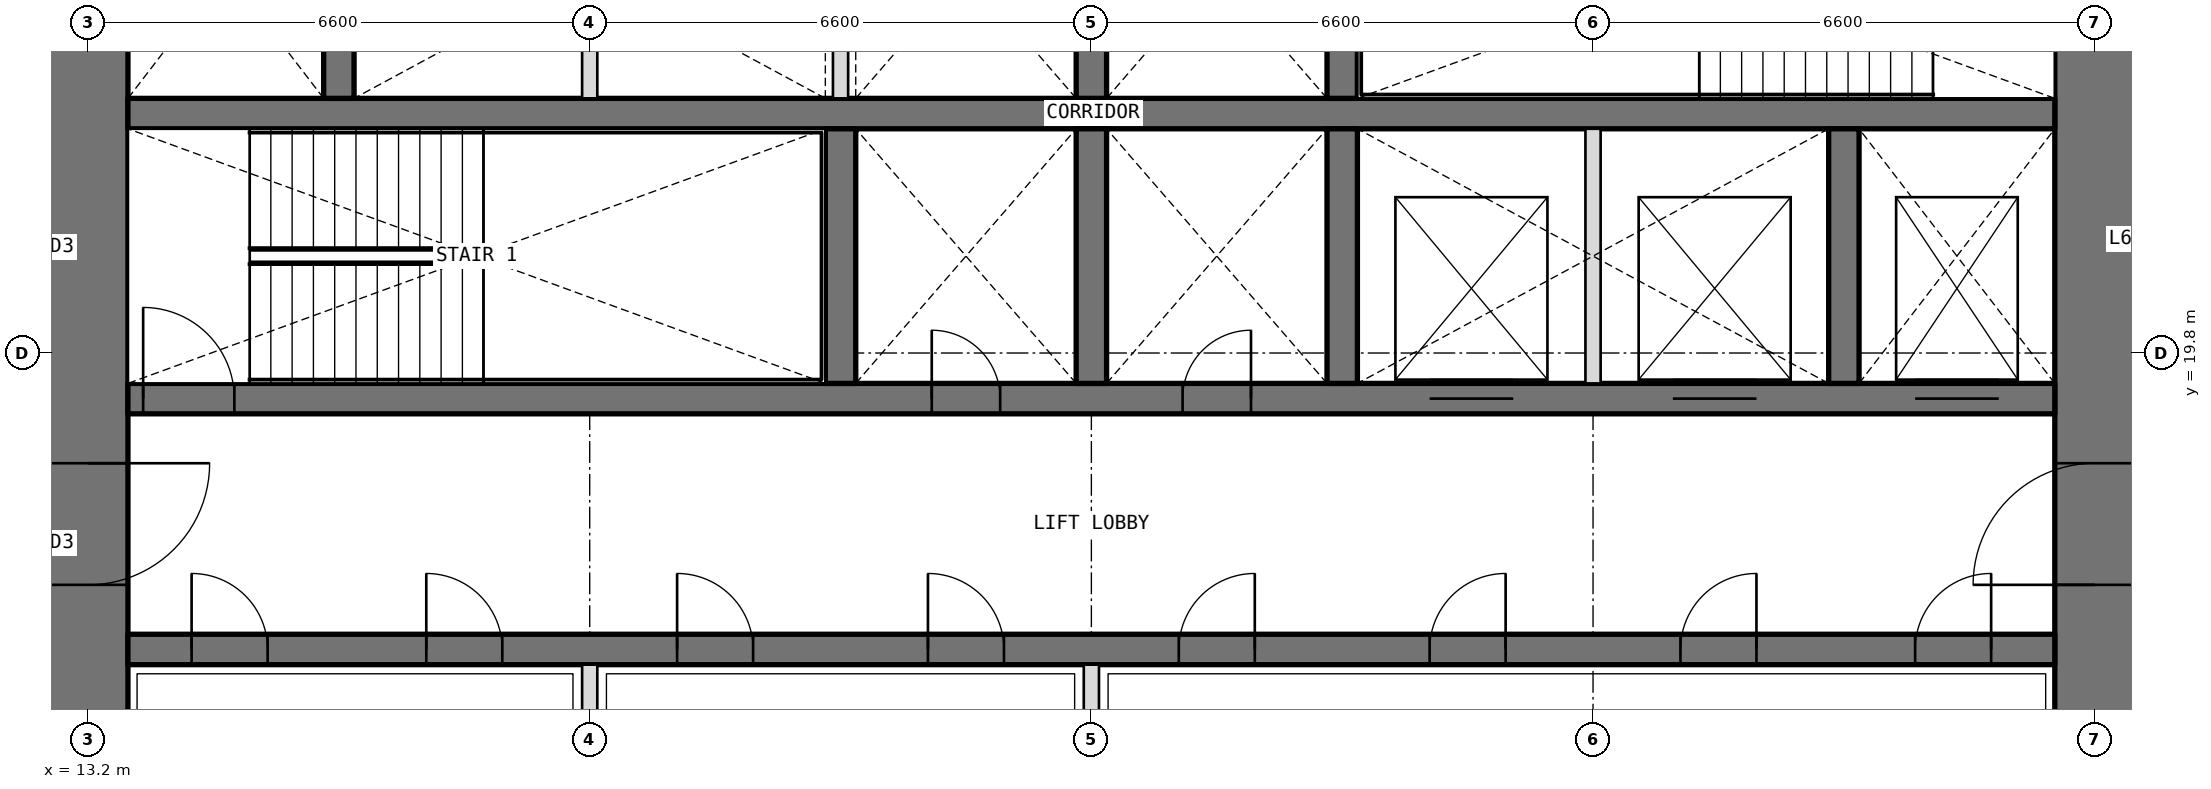
"""IFC4 building model, lengths in metres.
Left out: names, types, materials, properties, quantities, classifications, styles, units other than length and angle.
Written with IfcOpenShell. Run it as: python <this file> out.ifc"""

import sys

from ifc_helpers import new_model, si_unit, direction, frame, frame_2d, origin, place, context, subcontext, project, spatial, rectangle, extrude, element, fill, save


model = new_model("IFC4")
c1 = context("Model", 3, precision=1e-05, world=origin(), true_north=direction((0.0, 1.0)))
c2 = subcontext(c1, "Body", "Model", "MODEL_VIEW")
j1 = project(units=[si_unit("LENGTHUNIT", "METRE"), si_unit("PLANEANGLEUNIT", "RADIAN")], contexts=[c1])
p1 = place(None, origin())
s1 = spatial("IfcSite", under=j1, at=p1, CompositionType="ELEMENT")
p2 = place(p1, origin())
s2 = spatial("IfcBuilding", under=s1, at=p2, CompositionType="ELEMENT")
p3 = place(p2, frame((0.0, 0.0, 267.0)))
s3 = spatial("IfcBuildingStorey", under=s2, at=p3, CompositionType="ELEMENT", Elevation=267.0)
p4 = place(p3, frame((39.6, 13.725, 0.0), z_axis=(0.0, 0.0, 1.0), x_axis=(0.0, 1.0, 0.0)))
e1 = element("IfcWall", 1, at=p4, inside=s3, PredefinedType="SHEAR", context=c2, shape_type="SweptSolid", body=[
    extrude(rectangle(XDim=18.75, YDim=1.05, at=frame_2d((9.375, 0.0))), origin(), (0.0, 0.0, 1.0), 4.2),
])
p5 = place(p4, frame((3.025, 0.0, 0.0)))
e2 = element("IfcOpeningElement", 2, at=p5, cuts=e1, PredefinedType="OPENING", context=c2, shape_type="SweptSolid", body=[
    extrude(rectangle(XDim=1.6, YDim=2.1, at=frame_2d((0.8, 1.05))), frame((0.0, 0.535, 0.0), z_axis=(0.0, -1.0, 0.0), x_axis=(1.0, 0.0, 0.0)), (0.0, 0.0, 1.0), 1.07),
])
p6 = place(p4, frame((13.825, 0.0, 0.0)))
e3 = element("IfcOpeningElement", 3, at=p6, cuts=e1, PredefinedType="OPENING", context=c2, shape_type="SweptSolid", body=[
    extrude(rectangle(XDim=1.6, YDim=2.1, at=frame_2d((0.8, 1.05))), frame((0.0, 0.535, 0.0), z_axis=(0.0, -1.0, 0.0), x_axis=(1.0, 0.0, 0.0)), (0.0, 0.0, 1.0), 1.07),
])
p7 = place(p3, frame((13.2, 32.475, 0.0), z_axis=(0.0, 0.0, 1.0), x_axis=(0.0, -1.0, 0.0)))
e4 = element("IfcWall", 4, at=p7, inside=s3, PredefinedType="SHEAR", context=c2, shape_type="SweptSolid", body=[
    extrude(rectangle(XDim=18.75, YDim=1.05, at=frame_2d((9.375, 0.0))), origin(), (0.0, 0.0, 1.0), 4.2),
])
p8 = place(p7, frame((14.125, 0.0, 0.0)))
e5 = element("IfcOpeningElement", 5, at=p8, cuts=e4, PredefinedType="OPENING", context=c2, shape_type="SweptSolid", body=[
    extrude(rectangle(XDim=1.6, YDim=2.1, at=frame_2d((0.8, 1.05))), frame((0.0, 0.535, 0.0), z_axis=(0.0, -1.0, 0.0), x_axis=(1.0, 0.0, 0.0)), (0.0, 0.0, 1.0), 1.07),
])
p9 = place(p7, frame((3.325, 0.0, 0.0)))
e6 = element("IfcOpeningElement", 6, at=p9, cuts=e4, PredefinedType="OPENING", context=c2, shape_type="SweptSolid", body=[
    extrude(rectangle(XDim=1.6, YDim=2.1, at=frame_2d((0.8, 1.05))), frame((0.0, 0.535, 0.0), z_axis=(0.0, -1.0, 0.0), x_axis=(1.0, 0.0, 0.0)), (0.0, 0.0, 1.0), 1.07),
])
p10 = place(p3, frame((13.725, 15.9, 0.0), z_axis=(0.0, 0.0, 1.0), x_axis=(1.0, 0.0, 0.0)))
e7 = element("IfcWall", 7, at=p10, inside=s3, PredefinedType="SHEAR", context=c2, shape_type="SweptSolid", body=[
    extrude(rectangle(XDim=25.35, YDim=0.4, at=frame_2d((12.675, 0.0))), origin(), (0.0, 0.0, 1.0), 4.2),
])
p11 = place(p10, frame((0.837, 0.0, 0.0)))
e8 = element("IfcOpeningElement", 8, at=p11, cuts=e7, PredefinedType="OPENING", context=c2, shape_type="SweptSolid", body=[
    extrude(rectangle(XDim=1.0, YDim=2.1, at=frame_2d((0.5, 1.05))), frame((0.0, 0.21, 0.0), z_axis=(0.0, -1.0, 0.0), x_axis=(1.0, 0.0, 0.0)), (0.0, 0.0, 1.0), 0.42),
])
p12 = place(p10, frame((3.925, 0.0, 0.0)))
e9 = element("IfcOpeningElement", 9, at=p12, cuts=e7, PredefinedType="OPENING", context=c2, shape_type="SweptSolid", body=[
    extrude(rectangle(XDim=1.0, YDim=2.1, at=frame_2d((0.5, 1.05))), frame((0.0, 0.21, 0.0), z_axis=(0.0, -1.0, 0.0), x_axis=(1.0, 0.0, 0.0)), (0.0, 0.0, 1.0), 0.42),
])
p13 = place(p10, frame((7.225, 0.0, 0.0)))
e10 = element("IfcOpeningElement", 10, at=p13, cuts=e7, PredefinedType="OPENING", context=c2, shape_type="SweptSolid", body=[
    extrude(rectangle(XDim=1.0, YDim=2.1, at=frame_2d((0.5, 1.05))), frame((0.0, 0.21, 0.0), z_axis=(0.0, -1.0, 0.0), x_axis=(1.0, 0.0, 0.0)), (0.0, 0.0, 1.0), 0.42),
])
p14 = place(p10, frame((10.525, 0.0, 0.0)))
e11 = element("IfcOpeningElement", 11, at=p14, cuts=e7, PredefinedType="OPENING", context=c2, shape_type="SweptSolid", body=[
    extrude(rectangle(XDim=1.0, YDim=2.1, at=frame_2d((0.5, 1.05))), frame((0.0, 0.21, 0.0), z_axis=(0.0, -1.0, 0.0), x_axis=(1.0, 0.0, 0.0)), (0.0, 0.0, 1.0), 0.42),
])
p15 = place(p10, frame((13.825, 0.0, 0.0)))
e12 = element("IfcOpeningElement", 12, at=p15, cuts=e7, PredefinedType="OPENING", context=c2, shape_type="SweptSolid", body=[
    extrude(rectangle(XDim=1.0, YDim=2.1, at=frame_2d((0.5, 1.05))), frame((0.0, 0.21, 0.0), z_axis=(0.0, -1.0, 0.0), x_axis=(1.0, 0.0, 0.0)), (0.0, 0.0, 1.0), 0.42),
])
p16 = place(p10, frame((17.125, 0.0, 0.0)))
e13 = element("IfcOpeningElement", 13, at=p16, cuts=e7, PredefinedType="OPENING", context=c2, shape_type="SweptSolid", body=[
    extrude(rectangle(XDim=1.0, YDim=2.1, at=frame_2d((0.5, 1.05))), frame((0.0, 0.21, 0.0), z_axis=(0.0, -1.0, 0.0), x_axis=(1.0, 0.0, 0.0)), (0.0, 0.0, 1.0), 0.42),
])
p17 = place(p10, frame((20.425, 0.0, 0.0)))
e14 = element("IfcOpeningElement", 14, at=p17, cuts=e7, PredefinedType="OPENING", context=c2, shape_type="SweptSolid", body=[
    extrude(rectangle(XDim=1.0, YDim=2.1, at=frame_2d((0.5, 1.05))), frame((0.0, 0.21, 0.0), z_axis=(0.0, -1.0, 0.0), x_axis=(1.0, 0.0, 0.0)), (0.0, 0.0, 1.0), 0.42),
])
p18 = place(p10, frame((23.512, 0.0, 0.0)))
e15 = element("IfcOpeningElement", 15, at=p18, cuts=e7, PredefinedType="OPENING", context=c2, shape_type="SweptSolid", body=[
    extrude(rectangle(XDim=1.0, YDim=2.1, at=frame_2d((0.5, 1.05))), frame((0.0, 0.21, 0.0), z_axis=(0.0, -1.0, 0.0), x_axis=(1.0, 0.0, 0.0)), (0.0, 0.0, 1.0), 0.42),
])
p19 = place(p3, frame((13.725, 19.2, 0.0), z_axis=(0.0, 0.0, 1.0), x_axis=(1.0, 0.0, 0.0)))
e16 = element("IfcWall", 16, at=p19, inside=s3, PredefinedType="SHEAR", context=c2, shape_type="SweptSolid", body=[
    extrude(rectangle(XDim=25.35, YDim=0.4, at=frame_2d((12.675, 0.0))), origin(), (0.0, 0.0, 1.0), 4.2),
])
p20 = place(p19, frame((10.575, 0.0, 0.0)))
e17 = element("IfcOpeningElement", 17, at=p20, cuts=e16, PredefinedType="OPENING", context=c2, shape_type="SweptSolid", body=[
    extrude(rectangle(XDim=0.9, YDim=2.1, at=frame_2d((0.45, 1.05))), frame((0.0, 0.21, 0.0), z_axis=(0.0, -1.0, 0.0), x_axis=(1.0, 0.0, 0.0)), (0.0, 0.0, 1.0), 0.42),
])
p21 = place(p19, frame((13.875, 0.0, 0.0)))
e18 = element("IfcOpeningElement", 18, at=p21, cuts=e16, PredefinedType="OPENING", context=c2, shape_type="SweptSolid", body=[
    extrude(rectangle(XDim=0.9, YDim=2.1, at=frame_2d((0.45, 1.05))), frame((0.0, 0.21, 0.0), z_axis=(0.0, -1.0, 0.0), x_axis=(1.0, 0.0, 0.0)), (0.0, 0.0, 1.0), 0.42),
])
p22 = place(p19, frame((0.2, 0.0, 0.0)))
e19 = element("IfcOpeningElement", 19, at=p22, cuts=e16, PredefinedType="OPENING", context=c2, shape_type="SweptSolid", body=[
    extrude(rectangle(XDim=1.2, YDim=2.1, at=frame_2d((0.6, 1.05))), frame((0.0, 0.21, 0.0), z_axis=(0.0, -1.0, 0.0), x_axis=(1.0, 0.0, 0.0)), (0.0, 0.0, 1.0), 0.42),
])
p23 = place(p19, frame((23.512, 0.0, 0.0)))
e20 = element("IfcOpeningElement", 20, at=p23, cuts=e16, PredefinedType="OPENING", context=c2, shape_type="SweptSolid", body=[
    extrude(rectangle(XDim=1.1, YDim=2.1, at=frame_2d((0.55, 1.05))), frame((0.0, 0.21, 0.0), z_axis=(0.0, -1.0, 0.0), x_axis=(1.0, 0.0, 0.0)), (0.0, 0.0, 1.0), 0.42),
])
p24 = place(p19, frame((17.125, 0.0, 0.0)))
e21 = element("IfcOpeningElement", 21, at=p24, cuts=e16, PredefinedType="OPENING", context=c2, shape_type="SweptSolid", body=[
    extrude(rectangle(XDim=1.1, YDim=2.1, at=frame_2d((0.55, 1.05))), frame((0.0, 0.21, 0.0), z_axis=(0.0, -1.0, 0.0), x_axis=(1.0, 0.0, 0.0)), (0.0, 0.0, 1.0), 0.42),
])
p25 = place(p19, frame((20.325, 0.0, 0.0)))
e22 = element("IfcOpeningElement", 22, at=p25, cuts=e16, PredefinedType="OPENING", context=c2, shape_type="SweptSolid", body=[
    extrude(rectangle(XDim=1.1, YDim=2.1, at=frame_2d((0.55, 1.05))), frame((0.0, 0.21, 0.0), z_axis=(0.0, -1.0, 0.0), x_axis=(1.0, 0.0, 0.0)), (0.0, 0.0, 1.0), 0.42),
])
p26 = place(p3, frame((13.725, 22.95, 0.0), z_axis=(0.0, 0.0, 1.0), x_axis=(1.0, 0.0, 0.0)))
e23 = element("IfcWall", 23, at=p26, inside=s3, PredefinedType="SHEAR", context=c2, shape_type="SweptSolid", body=[
    extrude(rectangle(XDim=25.35, YDim=0.4, at=frame_2d((12.675, 0.0))), origin(), (0.0, 0.0, 1.0), 4.2),
])
for number, where, z_axis, x_axis in (
    (24, (23.1, 19.4, 0.0), (0.0, 0.0, 1.0), (0.0, 1.0, 0.0)),
    (25, (26.4, 19.4, 0.0), (0.0, 0.0, 1.0), (0.0, 1.0, 0.0)),
    (26, (29.7, 19.4, 0.0), (0.0, 0.0, 1.0), (0.0, 1.0, 0.0)),
    (27, (36.3, 19.4, 0.0), (0.0, 0.0, 1.0), (0.0, 1.0, 0.0)),
    (28, (16.5, 23.15, 0.0), (0.0, 0.0, 1.0), (0.0, 1.0, 0.0)),
    (29, (26.4, 23.15, 0.0), (0.0, 0.0, 1.0), (0.0, 1.0, 0.0)),
    (30, (29.7, 23.15, 0.0), (0.0, 0.0, 1.0), (0.0, 1.0, 0.0)),
):
    element("IfcWall", number, at=place(p3, frame(where, z_axis=z_axis, x_axis=x_axis)), inside=s3, PredefinedType="SHEAR", context=c2, shape_type="SweptSolid", body=[
        extrude(rectangle(XDim=3.35, YDim=0.4, at=frame_2d((1.675, 0.0))), origin(), (0.0, 0.0, 1.0), 4.2),
    ])
for number, where, z_axis, x_axis in (
    (31, (19.8, 13.725, 0.0), (0.0, 0.0, 1.0), (0.0, 1.0, 0.0)),
    (32, (26.4, 13.725, 0.0), (0.0, 0.0, 1.0), (0.0, 1.0, 0.0)),
):
    element("IfcWall", number, at=place(p3, frame(where, z_axis=z_axis, x_axis=x_axis)), inside=s3, PredefinedType="PARTITIONING", context=c2, shape_type="SweptSolid", body=[
        extrude(rectangle(XDim=1.975, YDim=0.2, at=frame_2d((0.987, 0.0))), origin(), (0.0, 0.0, 1.0), 4.2),
    ])
for number, where, z_axis, x_axis in (
    (33, (33.0, 19.4, 0.0), (0.0, 0.0, 1.0), (0.0, 1.0, 0.0)),
    (34, (19.8, 23.15, 0.0), (0.0, 0.0, 1.0), (0.0, 1.0, 0.0)),
    (35, (23.1, 23.15, 0.0), (0.0, 0.0, 1.0), (0.0, 1.0, 0.0)),
):
    element("IfcWall", number, at=place(p3, frame(where, z_axis=z_axis, x_axis=x_axis)), inside=s3, PredefinedType="PARTITIONING", context=c2, shape_type="SweptSolid", body=[
        extrude(rectangle(XDim=3.35, YDim=0.2, at=frame_2d((1.675, 0.0))), origin(), (0.0, 0.0, 1.0), 4.2),
    ])
p27 = place(p20, origin())
e36 = element("IfcDoor", 36, at=p27, inside=s3, OperationType="SINGLE_SWING_LEFT", PredefinedType="DOOR", context=c2, shape_type="SweptSolid", body=[
    extrude(rectangle(XDim=0.9, YDim=2.1, at=frame_2d((0.45, 1.05))), frame((0.0, 0.025, 0.0), z_axis=(0.0, -1.0, 0.0), x_axis=(1.0, 0.0, 0.0)), (0.0, 0.0, 1.0), 0.05),
])
fill(e17, e36)
p28 = place(p21, origin())
e37 = element("IfcDoor", 37, at=p28, inside=s3, OperationType="SINGLE_SWING_RIGHT", PredefinedType="DOOR", context=c2, shape_type="SweptSolid", body=[
    extrude(rectangle(XDim=0.9, YDim=2.1, at=frame_2d((0.45, 1.05))), frame((0.0, 0.025, 0.0), z_axis=(0.0, -1.0, 0.0), x_axis=(1.0, 0.0, 0.0)), (0.0, 0.0, 1.0), 0.05),
])
fill(e18, e37)
p29 = place(p11, origin())
e38 = element("IfcDoor", 38, at=p29, inside=s3, OperationType="SINGLE_SWING_LEFT", PredefinedType="DOOR", context=c2, shape_type="SweptSolid", body=[
    extrude(rectangle(XDim=1.0, YDim=2.1, at=frame_2d((0.5, 1.05))), frame((0.0, 0.025, 0.0), z_axis=(0.0, -1.0, 0.0), x_axis=(1.0, 0.0, 0.0)), (0.0, 0.0, 1.0), 0.05),
])
fill(e8, e38)
p30 = place(p12, origin())
e39 = element("IfcDoor", 39, at=p30, inside=s3, OperationType="SINGLE_SWING_LEFT", PredefinedType="DOOR", context=c2, shape_type="SweptSolid", body=[
    extrude(rectangle(XDim=1.0, YDim=2.1, at=frame_2d((0.5, 1.05))), frame((0.0, 0.025, 0.0), z_axis=(0.0, -1.0, 0.0), x_axis=(1.0, 0.0, 0.0)), (0.0, 0.0, 1.0), 0.05),
])
fill(e9, e39)
p31 = place(p13, origin())
e40 = element("IfcDoor", 40, at=p31, inside=s3, OperationType="SINGLE_SWING_LEFT", PredefinedType="DOOR", context=c2, shape_type="SweptSolid", body=[
    extrude(rectangle(XDim=1.0, YDim=2.1, at=frame_2d((0.5, 1.05))), frame((0.0, 0.025, 0.0), z_axis=(0.0, -1.0, 0.0), x_axis=(1.0, 0.0, 0.0)), (0.0, 0.0, 1.0), 0.05),
])
fill(e10, e40)
p32 = place(p14, origin())
e41 = element("IfcDoor", 41, at=p32, inside=s3, OperationType="SINGLE_SWING_LEFT", PredefinedType="DOOR", context=c2, shape_type="SweptSolid", body=[
    extrude(rectangle(XDim=1.0, YDim=2.1, at=frame_2d((0.5, 1.05))), frame((0.0, 0.025, 0.0), z_axis=(0.0, -1.0, 0.0), x_axis=(1.0, 0.0, 0.0)), (0.0, 0.0, 1.0), 0.05),
])
fill(e11, e41)
p33 = place(p15, origin())
e42 = element("IfcDoor", 42, at=p33, inside=s3, OperationType="SINGLE_SWING_RIGHT", PredefinedType="DOOR", context=c2, shape_type="SweptSolid", body=[
    extrude(rectangle(XDim=1.0, YDim=2.1, at=frame_2d((0.5, 1.05))), frame((0.0, 0.025, 0.0), z_axis=(0.0, -1.0, 0.0), x_axis=(1.0, 0.0, 0.0)), (0.0, 0.0, 1.0), 0.05),
])
fill(e12, e42)
p34 = place(p16, origin())
e43 = element("IfcDoor", 43, at=p34, inside=s3, OperationType="SINGLE_SWING_RIGHT", PredefinedType="DOOR", context=c2, shape_type="SweptSolid", body=[
    extrude(rectangle(XDim=1.0, YDim=2.1, at=frame_2d((0.5, 1.05))), frame((0.0, 0.025, 0.0), z_axis=(0.0, -1.0, 0.0), x_axis=(1.0, 0.0, 0.0)), (0.0, 0.0, 1.0), 0.05),
])
fill(e13, e43)
p35 = place(p17, origin())
e44 = element("IfcDoor", 44, at=p35, inside=s3, OperationType="SINGLE_SWING_RIGHT", PredefinedType="DOOR", context=c2, shape_type="SweptSolid", body=[
    extrude(rectangle(XDim=1.0, YDim=2.1, at=frame_2d((0.5, 1.05))), frame((0.0, 0.025, 0.0), z_axis=(0.0, -1.0, 0.0), x_axis=(1.0, 0.0, 0.0)), (0.0, 0.0, 1.0), 0.05),
])
fill(e14, e44)
p36 = place(p18, origin())
e45 = element("IfcDoor", 45, at=p36, inside=s3, OperationType="SINGLE_SWING_RIGHT", PredefinedType="DOOR", context=c2, shape_type="SweptSolid", body=[
    extrude(rectangle(XDim=1.0, YDim=2.1, at=frame_2d((0.5, 1.05))), frame((0.0, 0.025, 0.0), z_axis=(0.0, -1.0, 0.0), x_axis=(1.0, 0.0, 0.0)), (0.0, 0.0, 1.0), 0.05),
])
fill(e15, e45)
p37 = place(p22, origin())
e46 = element("IfcDoor", 46, at=p37, inside=s3, OperationType="SINGLE_SWING_LEFT", PredefinedType="DOOR", context=c2, shape_type="SweptSolid", body=[
    extrude(rectangle(XDim=1.2, YDim=2.1, at=frame_2d((0.6, 1.05))), frame((0.0, 0.025, 0.0), z_axis=(0.0, -1.0, 0.0), x_axis=(1.0, 0.0, 0.0)), (0.0, 0.0, 1.0), 0.05),
])
fill(e19, e46)
p38 = place(p8, origin())
e47 = element("IfcDoor", 47, at=p38, inside=s3, OperationType="DOUBLE_DOOR_DOUBLE_SWING", PredefinedType="DOOR", context=c2, shape_type="SweptSolid", body=[
    extrude(rectangle(XDim=1.6, YDim=2.1, at=frame_2d((0.8, 1.05))), frame((0.0, 0.025, 0.0), z_axis=(0.0, -1.0, 0.0), x_axis=(1.0, 0.0, 0.0)), (0.0, 0.0, 1.0), 0.05),
])
fill(e5, e47)
p39 = place(p5, origin())
e48 = element("IfcDoor", 48, at=p39, inside=s3, OperationType="DOUBLE_DOOR_DOUBLE_SWING", PredefinedType="DOOR", context=c2, shape_type="SweptSolid", body=[
    extrude(rectangle(XDim=1.6, YDim=2.1, at=frame_2d((0.8, 1.05))), frame((0.0, 0.025, 0.0), z_axis=(0.0, -1.0, 0.0), x_axis=(1.0, 0.0, 0.0)), (0.0, 0.0, 1.0), 0.05),
])
fill(e2, e48)
p40 = place(p23, origin())
e49 = element("IfcDoor", 49, at=p40, inside=s3, OperationType="DOUBLE_DOOR_SLIDING", PredefinedType="DOOR", context=c2, shape_type="SweptSolid", body=[
    extrude(rectangle(XDim=1.1, YDim=2.1, at=frame_2d((0.55, 1.05))), frame((0.0, 0.025, 0.0), z_axis=(0.0, -1.0, 0.0), x_axis=(1.0, 0.0, 0.0)), (0.0, 0.0, 1.0), 0.05),
])
fill(e20, e49)
p41 = place(p24, origin())
e50 = element("IfcDoor", 50, at=p41, inside=s3, OperationType="DOUBLE_DOOR_SLIDING", PredefinedType="DOOR", context=c2, shape_type="SweptSolid", body=[
    extrude(rectangle(XDim=1.1, YDim=2.1, at=frame_2d((0.55, 1.05))), frame((0.0, 0.025, 0.0), z_axis=(0.0, -1.0, 0.0), x_axis=(1.0, 0.0, 0.0)), (0.0, 0.0, 1.0), 0.05),
])
fill(e21, e50)
p42 = place(p25, origin())
e51 = element("IfcDoor", 51, at=p42, inside=s3, OperationType="DOUBLE_DOOR_SLIDING", PredefinedType="DOOR", context=c2, shape_type="SweptSolid", body=[
    extrude(rectangle(XDim=1.1, YDim=2.1, at=frame_2d((0.55, 1.05))), frame((0.0, 0.025, 0.0), z_axis=(0.0, -1.0, 0.0), x_axis=(1.0, 0.0, 0.0)), (0.0, 0.0, 1.0), 0.05),
])
fill(e22, e51)
save(model, sys.argv[1])
